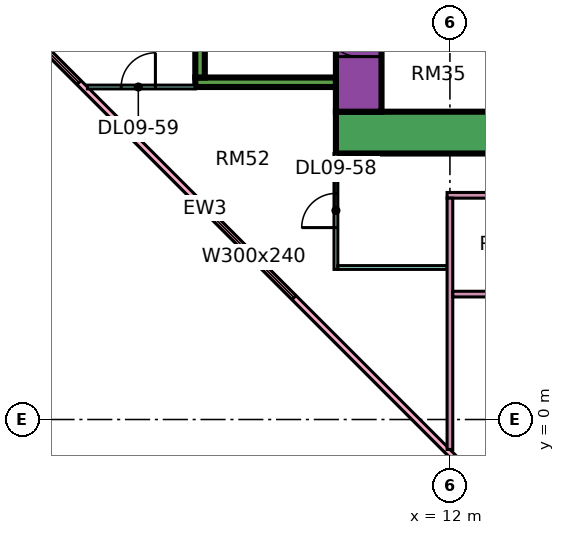
"""IFC4 building model, lengths in metres.
Left out: names, types, materials, properties, quantities, classifications, styles, units other than length and angle.
Written with IfcOpenShell. Run it as: python <this file> out.ifc"""

import sys

from ifc_helpers import new_model, si_unit, direction, frame, frame_2d, origin, place, context, subcontext, project, spatial, rectangle, extrude, element, fill, save


model = new_model("IFC4")
c1 = context("Model", 3, precision=1e-05, world=origin(), true_north=direction((0.0, 1.0)))
c2 = subcontext(c1, "Body", "Model", "MODEL_VIEW")
j1 = project(units=[si_unit("LENGTHUNIT", "METRE"), si_unit("PLANEANGLEUNIT", "RADIAN")], contexts=[c1])
p1 = place(None, origin())
s1 = spatial("IfcSite", under=j1, at=p1, CompositionType="ELEMENT")
p2 = place(p1, origin())
s2 = spatial("IfcBuilding", under=s1, at=p2, CompositionType="ELEMENT")
p3 = place(p2, frame((0.0, 0.0, 48.9)))
s3 = spatial("IfcBuildingStorey", under=s2, at=p3, CompositionType="ELEMENT", Elevation=48.9)
p4 = place(p3, frame((9.0, 7.55, 0.0), z_axis=(0.0, 0.0, 1.0), x_axis=(1.0, 0.0, 0.0)))
e1 = element("IfcWall", 1, at=p4, inside=s3, PredefinedType="SHEAR", context=c2, shape_type="SweptSolid", body=[
    extrude(rectangle(XDim=25.0, YDim=1.1, at=frame_2d((12.5, 0.0))), origin(), (0.0, 0.0, 1.0), 3.75),
])
p5 = place(p3, frame((9.6, 8.1, 0.0), z_axis=(0.0, 0.0, 1.0), x_axis=(0.0, 1.0, 0.0)))
e2 = element("IfcWall", 2, at=p5, inside=s3, PredefinedType="SHEAR", context=c2, shape_type="SweptSolid", body=[
    extrude(rectangle(XDim=10.8, YDim=1.2, at=frame_2d((5.4, 0.0))), origin(), (0.0, 0.0, 1.0), 3.75),
])
p6 = place(p5, frame((3.775, 0.0, 0.0)))
e3 = element("IfcOpeningElement", 3, at=p6, cuts=e2, PredefinedType="OPENING", context=c2, shape_type="SweptSolid", body=[
    extrude(rectangle(XDim=1.1, YDim=2.2, at=frame_2d((0.55, 1.1))), frame((0.0, 0.61, 0.0), z_axis=(0.0, -1.0, 0.0), x_axis=(1.0, 0.0, 0.0)), (0.0, 0.0, 1.0), 1.22),
])
p7 = place(p5, frame((6.275, 0.0, 0.0)))
e4 = element("IfcOpeningElement", 4, at=p7, cuts=e2, PredefinedType="OPENING", context=c2, shape_type="SweptSolid", body=[
    extrude(rectangle(XDim=1.1, YDim=2.2, at=frame_2d((0.55, 1.1))), frame((0.0, 0.61, 0.0), z_axis=(0.0, -1.0, 0.0), x_axis=(1.0, 0.0, 0.0)), (0.0, 0.0, 1.0), 1.22),
])
p8 = place(p5, frame((8.95, 0.0, 0.0)))
e5 = element("IfcOpeningElement", 5, at=p8, cuts=e2, PredefinedType="OPENING", context=c2, shape_type="SweptSolid", body=[
    extrude(rectangle(XDim=1.1, YDim=2.2, at=frame_2d((0.55, 1.1))), frame((0.0, 0.61, 0.0), z_axis=(0.0, -1.0, 0.0), x_axis=(1.0, 0.0, 0.0)), (0.0, 0.0, 1.0), 1.22),
])
p9 = place(p5, frame((1.45, 0.0, 0.0)))
e6 = element("IfcOpeningElement", 6, at=p9, cuts=e2, PredefinedType="OPENING", context=c2, shape_type="SweptSolid", body=[
    extrude(rectangle(XDim=0.9, YDim=2.1, at=frame_2d((0.45, 1.05))), frame((0.0, 0.61, 0.0), z_axis=(0.0, -1.0, 0.0), x_axis=(1.0, 0.0, 0.0)), (0.0, 0.0, 1.0), 1.22),
])
p10 = place(p3, frame((5.3, 8.875, 0.0), z_axis=(0.0, 0.0, 1.0), x_axis=(1.0, 0.0, 0.0)))
e7 = element("IfcWall", 7, at=p10, inside=s3, PredefinedType="SHEAR", context=c2, shape_type="SweptSolid", body=[
    extrude(rectangle(XDim=3.7, YDim=0.25, at=frame_2d((1.85, 0.0))), origin(), (0.0, 0.0, 1.0), 3.75),
])
p11 = place(p3, frame((5.425, 9.0, 0.0), z_axis=(0.0, 0.0, 1.0), x_axis=(0.0, 1.0, 0.0)))
e8 = element("IfcWall", 8, at=p11, inside=s3, PredefinedType="SHEAR", context=c2, shape_type="SweptSolid", body=[
    extrude(rectangle(XDim=4.0, YDim=0.25, at=frame_2d((2.0, 0.0))), origin(), (0.0, 0.0, 1.0), 3.75),
])
p12 = place(p3, frame((-1.447, 12.553, 0.0), z_axis=(0.0, 0.0, 1.0), x_axis=(0.707106781187, -0.707106781187, 0.0)))
e9 = element("IfcWall", 9, at=p12, inside=s3, PredefinedType="SOLIDWALL", context=c2, shape_type="SweptSolid", body=[
    extrude(rectangle(XDim=19.799, YDim=0.15, at=frame_2d((9.899, 0.0))), origin(), (0.0, 0.0, 1.0), 3.35),
])
p13 = place(p12, frame((2.212, 0.0, 0.45)))
e10 = element("IfcOpeningElement", 10, at=p13, cuts=e9, PredefinedType="OPENING", context=c2, shape_type="SweptSolid", body=[
    extrude(rectangle(XDim=3.0, YDim=2.4, at=frame_2d((1.5, 1.2))), frame((0.0, 0.085, 0.0), z_axis=(0.0, -1.0, 0.0), x_axis=(1.0, 0.0, 0.0)), (0.0, 0.0, 1.0), 0.17),
])
p14 = place(p12, frame((10.216, 0.0, 0.45)))
e11 = element("IfcOpeningElement", 11, at=p14, cuts=e9, PredefinedType="OPENING", context=c2, shape_type="SweptSolid", body=[
    extrude(rectangle(XDim=3.0, YDim=2.4, at=frame_2d((1.5, 1.2))), frame((0.0, 0.085, 0.0), z_axis=(0.0, -1.0, 0.0), x_axis=(1.0, 0.0, 0.0)), (0.0, 0.0, 1.0), 0.17),
])
p15 = place(p3, frame((2.461, 8.75, 0.0), z_axis=(0.0, 0.0, 1.0), x_axis=(1.0, 0.0, 0.0)))
e12 = element("IfcWall", 12, at=p15, inside=s3, PredefinedType="PARTITIONING", context=c2, shape_type="SweptSolid", body=[
    extrude(rectangle(XDim=2.839, YDim=0.1, at=frame_2d((1.419, 0.0))), origin(), (0.0, 0.0, 1.0), 3.35),
])
p16 = place(p15, frame((0.889, 0.0, 0.0)))
e13 = element("IfcOpeningElement", 13, at=p16, cuts=e12, PredefinedType="OPENING", context=c2, shape_type="SweptSolid", body=[
    extrude(rectangle(XDim=0.9, YDim=2.1, at=frame_2d((0.45, 1.05))), frame((0.0, 0.06, 0.0), z_axis=(0.0, -1.0, 0.0), x_axis=(1.0, 0.0, 0.0)), (0.0, 0.0, 1.0), 0.12),
])
p17 = place(p3, frame((9.0, 3.95, 0.0), z_axis=(0.0, 0.0, 1.0), x_axis=(0.0, 1.0, 0.0)))
e14 = element("IfcWall", 14, at=p17, inside=s3, PredefinedType="PARTITIONING", context=c2, shape_type="SweptSolid", body=[
    extrude(rectangle(XDim=3.05, YDim=0.1, at=frame_2d((1.525, 0.0))), origin(), (0.0, 0.0, 1.0), 3.35),
])
p18 = place(p17, frame((1.1, 0.0, 0.0)))
e15 = element("IfcOpeningElement", 15, at=p18, cuts=e14, PredefinedType="OPENING", context=c2, shape_type="SweptSolid", body=[
    extrude(rectangle(XDim=0.9, YDim=2.1, at=frame_2d((0.45, 1.05))), frame((0.0, 0.06, 0.0), z_axis=(0.0, -1.0, 0.0), x_axis=(1.0, 0.0, 0.0)), (0.0, 0.0, 1.0), 0.12),
])
p19 = place(p3, frame((9.05, 4.0, 0.0), z_axis=(0.0, 0.0, 1.0), x_axis=(1.0, 0.0, 0.0)))
e16 = element("IfcWall", 16, at=p19, inside=s3, PredefinedType="PARTITIONING", context=c2, shape_type="SweptSolid", body=[
    extrude(rectangle(XDim=2.875, YDim=0.1, at=frame_2d((1.438, 0.0))), origin(), (0.0, 0.0, 1.0), 3.35),
])
p20 = place(p3, frame((11.925, 5.9, 0.0), z_axis=(0.0, 0.0, 1.0), x_axis=(1.0, 0.0, 0.0)))
e17 = element("IfcWall", 17, at=p20, inside=s3, PredefinedType="PARTITIONING", context=c2, shape_type="SweptSolid", body=[
    extrude(rectangle(XDim=21.125, YDim=0.15, at=frame_2d((10.562, 0.0))), origin(), (0.0, 0.0, 1.0), 3.35),
])
p21 = place(p20, frame((7.125, 0.0, 0.0)))
e18 = element("IfcOpeningElement", 18, at=p21, cuts=e17, PredefinedType="OPENING", context=c2, shape_type="SweptSolid", body=[
    extrude(rectangle(XDim=0.9, YDim=2.1, at=frame_2d((0.45, 1.05))), frame((0.0, 0.085, 0.0), z_axis=(0.0, -1.0, 0.0), x_axis=(1.0, 0.0, 0.0)), (0.0, 0.0, 1.0), 0.17),
])
p22 = place(p20, frame((4.125, 0.0, 0.0)))
e19 = element("IfcOpeningElement", 19, at=p22, cuts=e17, PredefinedType="OPENING", context=c2, shape_type="SweptSolid", body=[
    extrude(rectangle(XDim=0.9, YDim=2.1, at=frame_2d((0.45, 1.05))), frame((0.0, 0.085, 0.0), z_axis=(0.0, -1.0, 0.0), x_axis=(1.0, 0.0, 0.0)), (0.0, 0.0, 1.0), 0.17),
])
p23 = place(p20, frame((13.125, 0.0, 0.0)))
e20 = element("IfcOpeningElement", 20, at=p23, cuts=e17, PredefinedType="OPENING", context=c2, shape_type="SweptSolid", body=[
    extrude(rectangle(XDim=0.9, YDim=2.1, at=frame_2d((0.45, 1.05))), frame((0.0, 0.085, 0.0), z_axis=(0.0, -1.0, 0.0), x_axis=(1.0, 0.0, 0.0)), (0.0, 0.0, 1.0), 0.17),
])
p24 = place(p3, frame((12.0, -0.788, 0.0), z_axis=(0.0, 0.0, 1.0), x_axis=(0.0, 1.0, 0.0)))
e21 = element("IfcWall", 21, at=p24, inside=s3, PredefinedType="PARTITIONING", context=c2, shape_type="SweptSolid", body=[
    extrude(rectangle(XDim=6.613, YDim=0.15, at=frame_2d((3.306, 0.0))), origin(), (0.0, 0.0, 1.0), 3.35),
])
p25 = place(p3, frame((12.075, 3.3, 0.0), z_axis=(0.0, 0.0, 1.0), x_axis=(1.0, 0.0, 0.0)))
e22 = element("IfcWall", 22, at=p25, inside=s3, PredefinedType="PARTITIONING", context=c2, shape_type="SweptSolid", body=[
    extrude(rectangle(XDim=3.0, YDim=0.15, at=frame_2d((1.5, 0.0))), origin(), (0.0, 0.0, 1.0), 3.35),
])
p26 = place(p13, origin())
e23 = element("IfcWindow", 23, at=p26, inside=s3, PartitioningType="SINGLE_PANEL", PredefinedType="WINDOW", context=c2, shape_type="SweptSolid", body=[
    extrude(rectangle(XDim=3.0, YDim=2.4, at=frame_2d((1.5, 1.2))), frame((0.0, 0.03, 0.0), z_axis=(0.0, -1.0, 0.0), x_axis=(1.0, 0.0, 0.0)), (0.0, 0.0, 1.0), 0.06),
])
fill(e10, e23)
p27 = place(p14, origin())
e24 = element("IfcWindow", 24, at=p27, inside=s3, PartitioningType="SINGLE_PANEL", PredefinedType="WINDOW", context=c2, shape_type="SweptSolid", body=[
    extrude(rectangle(XDim=3.0, YDim=2.4, at=frame_2d((1.5, 1.2))), frame((0.0, 0.03, 0.0), z_axis=(0.0, -1.0, 0.0), x_axis=(1.0, 0.0, 0.0)), (0.0, 0.0, 1.0), 0.06),
])
fill(e11, e24)
p28 = place(p9, frame((0.9, 0.0, 0.0), z_axis=(0.0, 0.0, 1.0), x_axis=(-1.0, 0.0, 0.0)))
e25 = element("IfcDoor", 25, at=p28, inside=s3, OperationType="SINGLE_SWING_RIGHT", PredefinedType="DOOR", context=c2, shape_type="SweptSolid", body=[
    extrude(rectangle(XDim=0.9, YDim=2.1, at=frame_2d((0.45, 1.05))), frame((0.0, 0.025, 0.0), z_axis=(0.0, -1.0, 0.0), x_axis=(1.0, 0.0, 0.0)), (0.0, 0.0, 1.0), 0.05),
])
fill(e6, e25)
p29 = place(p18, origin())
e26 = element("IfcDoor", 26, at=p29, inside=s3, OperationType="SINGLE_SWING_LEFT", PredefinedType="DOOR", context=c2, shape_type="SweptSolid", body=[
    extrude(rectangle(XDim=0.9, YDim=2.1, at=frame_2d((0.45, 1.05))), frame((0.0, 0.025, 0.0), z_axis=(0.0, -1.0, 0.0), x_axis=(1.0, 0.0, 0.0)), (0.0, 0.0, 1.0), 0.05),
])
fill(e15, e26)
p30 = place(p16, frame((0.9, 0.0, 0.0), z_axis=(0.0, 0.0, 1.0), x_axis=(-1.0, 0.0, 0.0)))
e27 = element("IfcDoor", 27, at=p30, inside=s3, OperationType="SINGLE_SWING_RIGHT", PredefinedType="DOOR", context=c2, shape_type="SweptSolid", body=[
    extrude(rectangle(XDim=0.9, YDim=2.1, at=frame_2d((0.45, 1.05))), frame((0.0, 0.025, 0.0), z_axis=(0.0, -1.0, 0.0), x_axis=(1.0, 0.0, 0.0)), (0.0, 0.0, 1.0), 0.05),
])
fill(e13, e27)
save(model, sys.argv[1])
